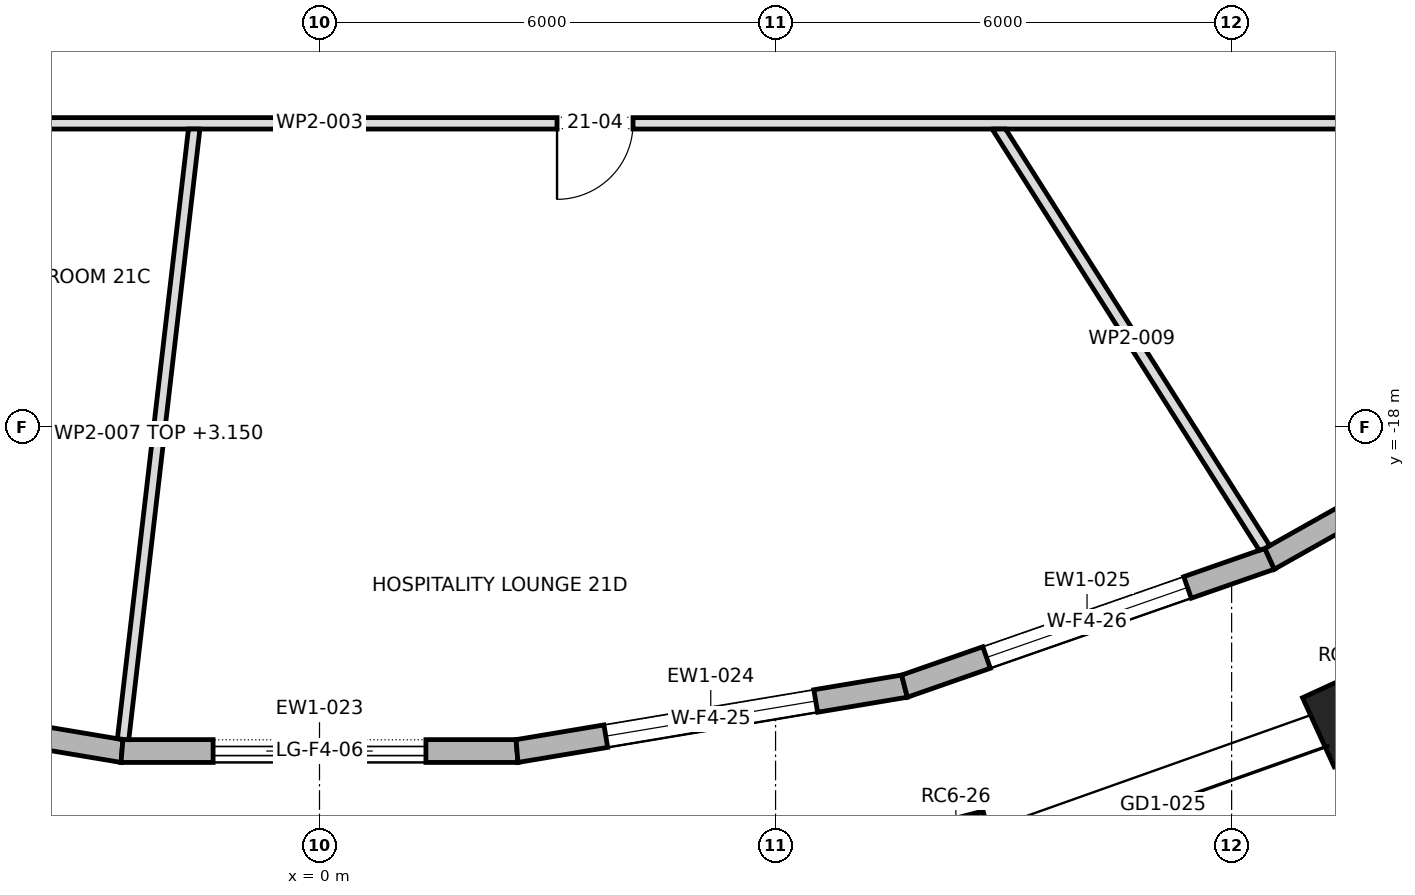
"""IFC4 building model, lengths in metres.
Left out: names, types, materials, properties, quantities, classifications, styles, units other than length and angle.
Written with IfcOpenShell. Run it as: python <this file> out.ifc"""

import sys

from ifc_helpers import new_model, si_unit, direction, frame, frame_2d, origin, origin_2d, place, context, subcontext, project, spatial, polyline, rectangle, outline, extrude, element, fill, save


model = new_model("IFC4")
c1 = context("Model", 3, precision=1e-05, world=origin(), true_north=direction((0.0, 1.0)))
c2 = subcontext(c1, "Body", "Model", "MODEL_VIEW")
j1 = project(units=[si_unit("LENGTHUNIT", "METRE"), si_unit("PLANEANGLEUNIT", "RADIAN")], contexts=[c1])
p1 = place(None, origin())
s1 = spatial("IfcSite", under=j1, at=p1, CompositionType="ELEMENT")
p2 = place(p1, origin())
s2 = spatial("IfcBuilding", under=s1, at=p2, CompositionType="ELEMENT")
p3 = place(p2, frame((0.0, 0.0, 300.3)))
s3 = spatial("IfcBuildingStorey", under=s2, at=p3, CompositionType="ELEMENT", Elevation=300.3)
for number, where, z_axis, x_axis in (
    (1, (8.372, -23.657, 0.0), (0.0, 0.0, 1.0), (0.968, 0.252, 0.0)),
    (2, (13.596, -21.803, 0.0), (0.0, 0.0, 1.0), (0.909, 0.417, 0.0)),
):
    element("IfcColumn", number, at=place(p3, frame(where, z_axis=z_axis, x_axis=x_axis)), inside=s3, PredefinedType="COLUMN", context=c2, shape_type="SweptSolid", body=[
        extrude(rectangle(XDim=1.0, YDim=1.0, at=origin_2d()), origin(), (0.0, 0.0, 1.0), 4.0),
    ])
p4 = place(p3, frame((-7.696, -21.404, 0.0), z_axis=(0.0, 0.0, 1.0), x_axis=(0.986263399459, -0.165180225475, 0.0)))
e3 = element("IfcWall", 3, at=p4, inside=s3, PredefinedType="STANDARD", context=c2, shape_type="SweptSolid", body=[
    extrude(outline(polyline([(-0.013, -0.15), (5.181, -0.15), (5.156, 0.15), (0.013, 0.15), (-0.013, -0.15)])), origin(), (0.0, 0.0, 1.0), 3.7),
])
p5 = place(p4, frame((1.184, 0.0, 0.6)))
e4 = element("IfcOpeningElement", 4, at=p5, cuts=e3, PredefinedType="OPENING", context=c2, shape_type="SweptSolid", body=[
    extrude(rectangle(XDim=2.8, YDim=2.65, at=frame_2d((1.4, 1.325))), frame((0.0, 0.162, 0.0), z_axis=(0.0, -1.0, 0.0), x_axis=(1.0, 0.0, 0.0)), (0.0, 0.0, 1.0), 0.324),
])
p6 = place(p3, frame((-2.599, -22.258, 0.0), z_axis=(0.0, 0.0, 1.0), x_axis=(1.0, 0.0, 0.0)))
e5 = element("IfcWall", 5, at=p6, inside=s3, PredefinedType="STANDARD", context=c2, shape_type="SweptSolid", body=[
    extrude(outline(polyline([(-0.012, -0.15), (5.21, -0.15), (5.185, 0.15), (0.012, 0.15), (-0.012, -0.15)])), origin(), (0.0, 0.0, 1.0), 3.7),
])
p7 = place(p6, frame((1.198, 0.0, 0.0)))
e6 = element("IfcOpeningElement", 6, at=p7, cuts=e5, PredefinedType="OPENING", context=c2, shape_type="SweptSolid", body=[
    extrude(rectangle(XDim=2.8, YDim=3.25, at=frame_2d((1.4, 1.625))), frame((0.0, 0.162, 0.0), z_axis=(0.0, -1.0, 0.0), x_axis=(1.0, 0.0, 0.0)), (0.0, 0.0, 1.0), 0.324),
])
p8 = place(p3, frame((2.599, -22.258, 0.0), z_axis=(0.0, 0.0, 1.0), x_axis=(0.986263399459, 0.165180225475, 0.0)))
e7 = element("IfcWall", 7, at=p8, inside=s3, PredefinedType="STANDARD", context=c2, shape_type="SweptSolid", body=[
    extrude(outline(polyline([(-0.012, -0.15), (5.181, -0.15), (5.156, 0.15), (0.012, 0.15), (-0.012, -0.15)])), origin(), (0.0, 0.0, 1.0), 3.7),
])
p9 = place(p8, frame((1.184, 0.0, 0.6)))
e8 = element("IfcOpeningElement", 8, at=p9, cuts=e7, PredefinedType="OPENING", context=c2, shape_type="SweptSolid", body=[
    extrude(rectangle(XDim=2.8, YDim=2.65, at=frame_2d((1.4, 1.325))), frame((0.0, 0.162, 0.0), z_axis=(0.0, -1.0, 0.0), x_axis=(1.0, 0.0, 0.0)), (0.0, 0.0, 1.0), 0.324),
])
p10 = place(p3, frame((7.696, -21.404, 0.0), z_axis=(0.0, 0.0, 1.0), x_axis=(0.944230376095, 0.329285585564, 0.0)))
e9 = element("IfcWall", 9, at=p10, inside=s3, PredefinedType="STANDARD", context=c2, shape_type="SweptSolid", body=[
    extrude(outline(polyline([(-0.013, -0.15), (5.1, -0.15), (5.073, 0.15), (0.013, 0.15), (-0.013, -0.15)])), origin(), (0.0, 0.0, 1.0), 3.7),
])
p11 = place(p10, frame((1.143, 0.0, 0.6)))
e10 = element("IfcOpeningElement", 10, at=p11, cuts=e9, PredefinedType="OPENING", context=c2, shape_type="SweptSolid", body=[
    extrude(rectangle(XDim=2.8, YDim=2.65, at=frame_2d((1.4, 1.325))), frame((0.0, 0.162, 0.0), z_axis=(0.0, -1.0, 0.0), x_axis=(1.0, 0.0, 0.0)), (0.0, 0.0, 1.0), 0.324),
])
p12 = place(p3, frame((12.5, -19.729, 0.0), z_axis=(0.0, 0.0, 1.0), x_axis=(0.871512454536, 0.490373369575, 0.0)))
e11 = element("IfcWall", 11, at=p12, inside=s3, PredefinedType="STANDARD", context=c2, shape_type="SweptSolid", body=[
    extrude(outline(polyline([(-0.013, -0.15), (4.976, -0.15), (4.948, 0.15), (0.013, 0.15), (-0.013, -0.15)])), origin(), (0.0, 0.0, 1.0), 3.7),
])
p13 = place(p12, frame((1.081, 0.0, 0.6)))
e12 = element("IfcOpeningElement", 12, at=p13, cuts=e11, PredefinedType="OPENING", context=c2, shape_type="SweptSolid", body=[
    extrude(rectangle(XDim=2.8, YDim=2.65, at=frame_2d((1.4, 1.325))), frame((0.0, 0.162, 0.0), z_axis=(0.0, -1.0, 0.0), x_axis=(1.0, 0.0, 0.0)), (0.0, 0.0, 1.0), 0.324),
])
p14 = place(p3, frame((-14.075, -14.0, 0.0), z_axis=(0.0, 0.0, 1.0), x_axis=(1.0, 0.0, 0.0)))
e13 = element("IfcWall", 13, at=p14, inside=s3, PredefinedType="PARTITIONING", context=c2, shape_type="SweptSolid", body=[
    extrude(outline(polyline([(0.0, -0.075), (1.877, -0.075), (3.753, -0.075), (5.63, -0.075), (7.507, -0.075), (9.383, -0.075), (11.26, -0.075), (13.137, -0.075), (15.013, -0.075), (16.89, -0.075), (18.767, -0.075), (20.643, -0.075), (22.52, -0.075), (24.396, -0.075), (26.273, -0.075), (28.15, -0.075), (28.0, 0.075), (26.011, 0.075), (24.021, 0.075), (22.032, 0.075), (20.043, 0.075), (18.053, 0.075), (16.064, 0.075), (14.075, 0.075), (12.086, 0.075), (10.096, 0.075), (8.107, 0.075), (6.118, 0.075), (4.128, 0.075), (2.139, 0.075), (0.15, 0.075), (0.0, -0.075)])), origin(), (0.0, 0.0, 1.0), 3.7),
])
p15 = place(p14, frame((5.93, 0.0, 0.0)))
e14 = element("IfcOpeningElement", 14, at=p15, cuts=e13, PredefinedType="OPENING", context=c2, shape_type="SweptSolid", body=[
    extrude(rectangle(XDim=1.0, YDim=2.1, at=frame_2d((0.5, 1.05))), frame((0.0, 0.087, 0.0), z_axis=(0.0, -1.0, 0.0), x_axis=(1.0, 0.0, 0.0)), (0.0, 0.0, 1.0), 0.174),
])
p16 = place(p14, frame((17.2, 0.0, 0.0)))
e15 = element("IfcOpeningElement", 15, at=p16, cuts=e13, PredefinedType="OPENING", context=c2, shape_type="SweptSolid", body=[
    extrude(rectangle(XDim=1.0, YDim=2.1, at=frame_2d((0.5, 1.05))), frame((0.0, 0.087, 0.0), z_axis=(0.0, -1.0, 0.0), x_axis=(1.0, 0.0, 0.0)), (0.0, 0.0, 1.0), 0.174),
])
p17 = place(p3, frame((-1.648, -14.066, 0.0), z_axis=(0.0, 0.0, 1.0), x_axis=(-0.115734847025, -0.993280144362, 0.0)))
e16 = element("IfcWall", 16, at=p17, inside=s3, PredefinedType="PARTITIONING", context=c2, shape_type="SweptSolid", body=[
    extrude(outline(polyline([(8.092, -0.075), (8.092, 0.034), (8.087, 0.075), (6.47, 0.075), (4.852, 0.075), (3.235, 0.075), (1.617, 0.075), (0.0, 0.075), (0.0, 0.074), (0.017, -0.075), (1.632, -0.075), (3.247, -0.075), (4.862, -0.075), (6.477, -0.075), (8.092, -0.075)])), origin(), (0.0, 0.0, 1.0), 3.15),
])
p18 = place(p3, frame((8.912, -14.035, 0.0), z_axis=(0.0, 0.0, 1.0), x_axis=(0.535569757711, -0.844490991442, 0.0)))
e17 = element("IfcWall", 17, at=p18, inside=s3, PredefinedType="PARTITIONING", context=c2, shape_type="SweptSolid", body=[
    extrude(outline(polyline([(0.0, -0.075), (1.641, -0.075), (3.281, -0.075), (4.922, -0.075), (6.563, -0.075), (6.581, 0.001), (6.585, 0.073), (6.585, 0.075), (4.962, 0.075), (3.34, 0.075), (1.718, 0.075), (0.095, 0.075), (0.0, -0.075), (0.0, -0.075)])), origin(), (0.0, 0.0, 1.0), 3.7),
])
p19 = place(p7, origin())
e18 = element("IfcDoor", 18, at=p19, inside=s3, OperationType="DOUBLE_DOOR_SLIDING", PredefinedType="DOOR", context=c2, shape_type="SweptSolid", body=[
    extrude(rectangle(XDim=2.8, YDim=3.25, at=frame_2d((1.4, 1.625))), frame((0.0, 0.025, 0.0), z_axis=(0.0, -1.0, 0.0), x_axis=(1.0, 0.0, 0.0)), (0.0, 0.0, 1.0), 0.05),
])
fill(e6, e18)
p20 = place(p9, origin())
e19 = element("IfcWindow", 19, at=p20, inside=s3, PartitioningType="DOUBLE_PANEL_VERTICAL", PredefinedType="WINDOW", context=c2, shape_type="SweptSolid", body=[
    extrude(rectangle(XDim=2.8, YDim=2.65, at=frame_2d((1.4, 1.325))), frame((0.0, 0.03, 0.0), z_axis=(0.0, -1.0, 0.0), x_axis=(1.0, 0.0, 0.0)), (0.0, 0.0, 1.0), 0.06),
])
fill(e8, e19)
p21 = place(p11, origin())
e20 = element("IfcWindow", 20, at=p21, inside=s3, PartitioningType="DOUBLE_PANEL_VERTICAL", PredefinedType="WINDOW", context=c2, shape_type="SweptSolid", body=[
    extrude(rectangle(XDim=2.8, YDim=2.65, at=frame_2d((1.4, 1.325))), frame((0.0, 0.03, 0.0), z_axis=(0.0, -1.0, 0.0), x_axis=(1.0, 0.0, 0.0)), (0.0, 0.0, 1.0), 0.06),
])
fill(e10, e20)
p22 = place(p16, frame((1.0, 0.0, 0.0), z_axis=(0.0, 0.0, 1.0), x_axis=(-1.0, 0.0, 0.0)))
e21 = element("IfcDoor", 21, at=p22, inside=s3, OperationType="SINGLE_SWING_LEFT", PredefinedType="DOOR", context=c2, shape_type="SweptSolid", body=[
    extrude(rectangle(XDim=1.0, YDim=2.1, at=frame_2d((0.5, 1.05))), frame((0.0, 0.025, 0.0), z_axis=(0.0, -1.0, 0.0), x_axis=(1.0, 0.0, 0.0)), (0.0, 0.0, 1.0), 0.05),
])
fill(e15, e21)
save(model, sys.argv[1])
